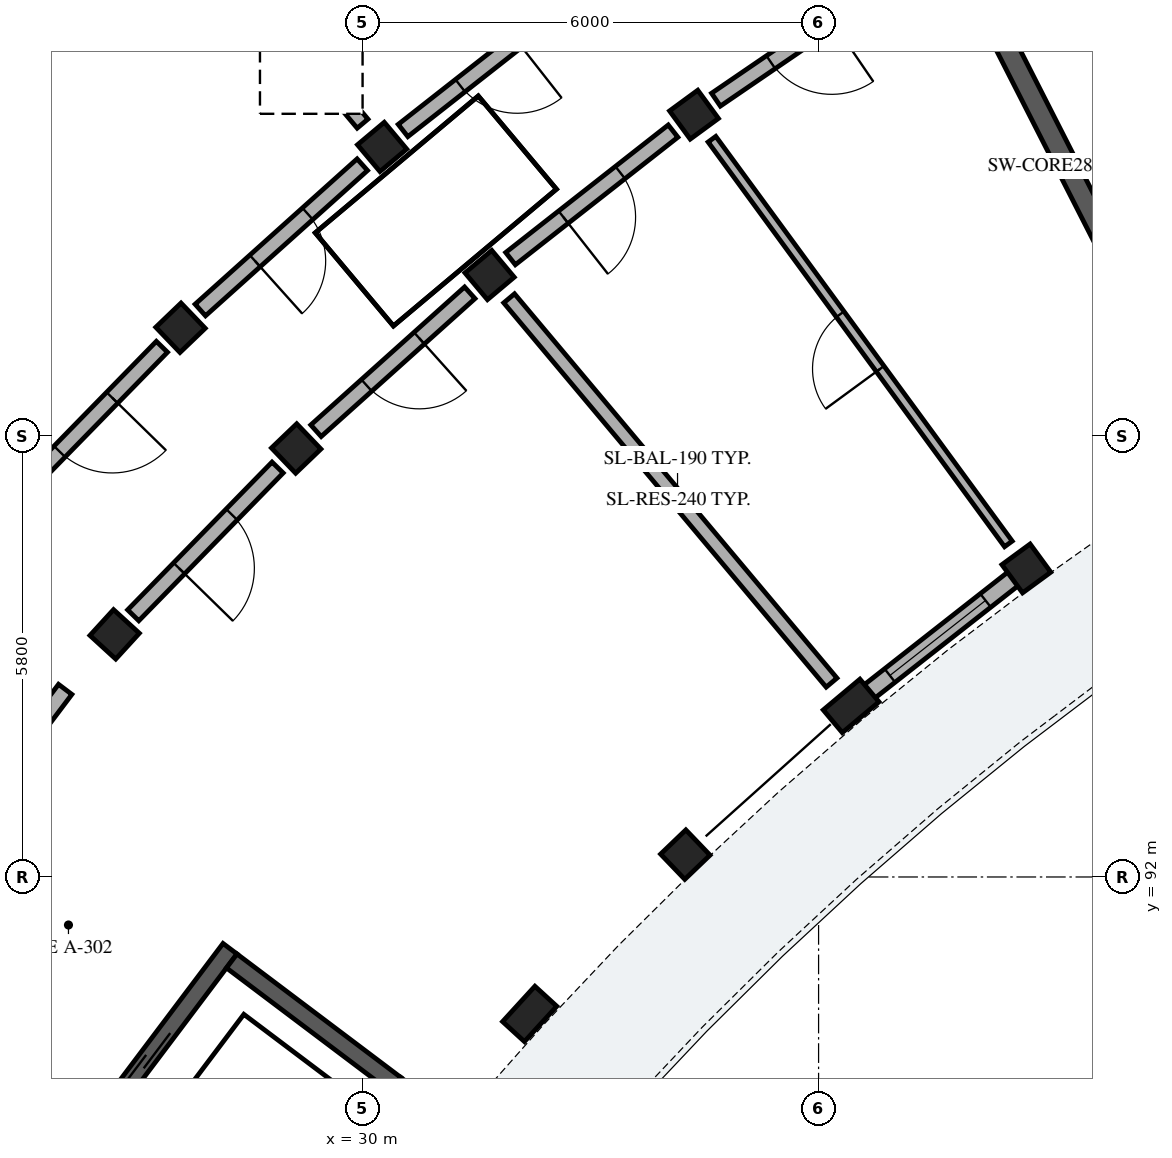
"""IFC4 building model, lengths in metres.
Left out: names, types, materials, properties, quantities, classifications, styles, units other than length and angle.
Written with IfcOpenShell. Run it as: python <this file> out.ifc"""

import sys

from ifc_helpers import new_model, si_unit, direction, frame, frame_2d, origin, origin_2d, place, context, subcontext, project, spatial, rectangle, extrude, element, fill, save


model = new_model("IFC4")
c1 = context("Model", 3, precision=1e-05, world=origin(), true_north=direction((0.0, 1.0)))
c2 = subcontext(c1, "Body", "Model", "MODEL_VIEW")
j1 = project(units=[si_unit("LENGTHUNIT", "METRE"), si_unit("PLANEANGLEUNIT", "RADIAN")], contexts=[c1])
p1 = place(None, origin())
s1 = spatial("IfcSite", under=j1, at=p1, CompositionType="ELEMENT")
p2 = place(p1, origin())
s2 = spatial("IfcBuilding", under=s1, at=p2, CompositionType="ELEMENT")
p3 = place(p2, frame((0.0, 0.0, 49.16)))
s3 = spatial("IfcBuildingStorey", under=s2, at=p3, CompositionType="ELEMENT", Elevation=49.16)
p4 = place(p3, frame((37.773, 104.296, 0.0), z_axis=(0.0, 0.0, 1.0), x_axis=(0.453992276384, -0.891005618941, 0.0)))
e1 = element("IfcWall", 1, at=p4, inside=s3, PredefinedType="SHEAR", context=c2, shape_type="SweptSolid", body=[
    extrude(rectangle(XDim=6.6, YDim=0.28, at=frame_2d((3.3, 0.0))), origin(), (0.0, 0.0, 1.0), 3.11),
])
p5 = place(p3, frame((23.125, 90.453, 0.0), z_axis=(0.0, 0.0, 1.0), x_axis=(0.798639633744, -0.601809550782, 0.0)))
e2 = element("IfcWall", 2, at=p5, inside=s3, PredefinedType="SHEAR", context=c2, shape_type="SweptSolid", body=[
    extrude(rectangle(XDim=6.6, YDim=0.28, at=frame_2d((3.3, 0.0))), origin(), (0.0, 0.0, 1.0), 3.11),
])
p6 = place(p5, frame((0.22, 0.0, 0.0)))
e3 = element("IfcOpeningElement", 3, at=p6, cuts=e2, PredefinedType="OPENING", context=c2, shape_type="SweptSolid", body=[
    extrude(rectangle(XDim=1.05, YDim=2.15, at=frame_2d((0.525, 1.075))), frame((0.0, 0.15, 0.0), z_axis=(0.0, -1.0, 0.0), x_axis=(1.0, 0.0, 0.0)), (0.0, 0.0, 1.0), 0.3),
])
p7 = place(p3, frame((26.294, 88.453, 0.0), z_axis=(0.0, 0.0, 1.0), x_axis=(0.601819781152, 0.798631924615, 0.0)))
e4 = element("IfcWall", 4, at=p7, inside=s3, PredefinedType="SHEAR", context=c2, shape_type="SweptSolid", body=[
    extrude(rectangle(XDim=3.26, YDim=0.23, at=frame_2d((1.63, 0.0))), origin(), (0.0, 0.0, 1.0), 3.11),
])
p8 = place(p7, frame((0.9, 0.0, 0.0)))
e5 = element("IfcOpeningElement", 5, at=p8, cuts=e4, PredefinedType="OPENING", context=c2, shape_type="SweptSolid", body=[
    extrude(rectangle(XDim=1.0, YDim=2.15, at=frame_2d((0.5, 1.075))), frame((0.0, 0.125, 0.0), z_axis=(0.0, -1.0, 0.0), x_axis=(1.0, 0.0, 0.0)), (0.0, 0.0, 1.0), 0.25),
])
p9 = place(p3, frame((28.634, 86.69, 0.0), z_axis=(0.0, 0.0, 1.0), x_axis=(0.601819781152, 0.798631924615, 0.0)))
e6 = element("IfcWall", 6, at=p9, inside=s3, PredefinedType="SHEAR", context=c2, shape_type="SweptSolid", body=[
    extrude(rectangle(XDim=3.26, YDim=0.23, at=frame_2d((1.63, 0.0))), origin(), (0.0, 0.0, 1.0), 3.11),
])
p10 = place(p3, frame((28.279, 90.896, 0.0), z_axis=(0.0, 0.0, 1.0), x_axis=(0.798608971494, -0.601850239387, 0.0)))
e7 = element("IfcWall", 7, at=p10, inside=s3, PredefinedType="SHEAR", context=c2, shape_type="SweptSolid", body=[
    extrude(rectangle(XDim=2.7, YDim=0.23, at=frame_2d((1.35, 0.0))), origin(), (0.0, 0.0, 1.0), 3.11),
])
for number, where, z_axis, x_axis in (
    (8, (38.734, 96.059, 0.0), (0.0, 0.0, 1.0), (-0.591, 0.807, 0.0)),
    (9, (34.361, 102.029, 0.0), (0.0, 0.0, 1.0), (-0.591, 0.807, 0.0)),
):
    element("IfcColumn", number, at=place(p3, frame(where, z_axis=z_axis, x_axis=x_axis)), inside=s3, PredefinedType="COLUMN", context=c2, shape_type="SweptSolid", body=[
        extrude(rectangle(XDim=0.46, YDim=0.46, at=origin_2d()), origin(), (0.0, 0.0, 1.0), 3.1),
    ])
p11 = place(p3, frame((36.428, 94.251, 0.0), z_axis=(0.0, 0.0, 1.0), x_axis=(-0.642787636427, 0.766044420681, 0.0)))
e10 = element("IfcColumn", 10, at=p11, inside=s3, PredefinedType="PILASTER", context=c2, shape_type="SweptSolid", body=[
    extrude(rectangle(XDim=0.39, YDim=0.63, at=origin_2d()), origin(), (0.0, 0.0, 1.0), 3.1),
])
for number, where, z_axis, x_axis in (
    (11, (31.671, 99.919, 0.0), (0.0, 0.0, 1.0), (-0.643, 0.766, 0.0)),
    (12, (30.257, 101.605, 0.0), (0.0, 0.0, 1.0), (-0.643, 0.766, 0.0)),
    (13, (34.247, 92.294, 0.0), (0.0, 0.0, 1.0), (-0.692, 0.722, 0.0)),
    (14, (29.127, 97.637, 0.0), (0.0, 0.0, 1.0), (-0.692, 0.722, 0.0)),
    (15, (27.605, 99.226, 0.0), (0.0, 0.0, 1.0), (-0.692, 0.722, 0.0)),
):
    element("IfcColumn", number, at=place(p3, frame(where, z_axis=z_axis, x_axis=x_axis)), inside=s3, PredefinedType="COLUMN", context=c2, shape_type="SweptSolid", body=[
        extrude(rectangle(XDim=0.46, YDim=0.46, at=origin_2d()), origin(), (0.0, 0.0, 1.0), 3.1),
    ])
p12 = place(p3, frame((32.199, 90.198, 0.0), z_axis=(0.0, 0.0, 1.0), x_axis=(-0.737932089665, 0.674874974378, 0.0)))
e16 = element("IfcColumn", 16, at=p12, inside=s3, PredefinedType="PILASTER", context=c2, shape_type="SweptSolid", body=[
    extrude(rectangle(XDim=0.39, YDim=0.63, at=origin_2d()), origin(), (0.0, 0.0, 1.0), 3.1),
])
p13 = place(p3, frame((26.738, 95.192, 0.0), z_axis=(0.0, 0.0, 1.0), x_axis=(-0.737932089665, 0.674874974378, 0.0)))
e17 = element("IfcColumn", 17, at=p13, inside=s3, PredefinedType="COLUMN", context=c2, shape_type="SweptSolid", body=[
    extrude(rectangle(XDim=0.46, YDim=0.46, at=origin_2d()), origin(), (0.0, 0.0, 1.0), 3.1),
])
p14 = place(p3, frame((38.576, 95.936, 0.0), z_axis=(0.0, 0.0, 1.0), x_axis=(-0.786839825132, -0.617157264874, 0.0)))
e18 = element("IfcWall", 18, at=p14, inside=s3, PredefinedType="SOLIDWALL", context=c2, shape_type="SweptSolid", body=[
    extrude(rectangle(XDim=2.565, YDim=0.225, at=frame_2d((1.283, 0.0))), origin(), (0.0, 0.0, 1.0), 2.355),
])
p15 = place(p14, frame((0.483, 0.0, 0.35)))
e19 = element("IfcOpeningElement", 19, at=p15, cuts=e18, PredefinedType="OPENING", context=c2, shape_type="SweptSolid", body=[
    extrude(rectangle(XDim=1.6, YDim=1.75, at=frame_2d((0.8, 0.875))), frame((0.0, 0.123, 0.0), z_axis=(0.0, -1.0, 0.0), x_axis=(1.0, 0.0, 0.0)), (0.0, 0.0, 1.0), 0.245),
])
p16 = place(p3, frame((23.139, 90.555, 0.0), z_axis=(0.0, 0.0, 1.0), x_axis=(0.601792209296, 0.79865270101, 0.0)))
e20 = element("IfcWall", 20, at=p16, inside=s3, PredefinedType="PARTITIONING", context=c2, shape_type="SweptSolid", body=[
    extrude(rectangle(XDim=4.9, YDim=0.22, at=frame_2d((2.45, 0.0))), origin(), (0.0, 0.0, 1.0), 2.34),
])
p17 = place(p16, frame((1.95, 0.0, 0.0)))
e21 = element("IfcOpeningElement", 21, at=p17, cuts=e20, PredefinedType="OPENING", context=c2, shape_type="SweptSolid", body=[
    extrude(rectangle(XDim=0.98, YDim=2.14, at=frame_2d((0.49, 1.07))), frame((0.0, 0.12, 0.0), z_axis=(0.0, -1.0, 0.0), x_axis=(1.0, 0.0, 0.0)), (0.0, 0.0, 1.0), 0.24),
])
p18 = place(p3, frame((36.895, 103.76, 0.0), z_axis=(0.0, 0.0, 1.0), x_axis=(-0.825752009056, -0.56403334967, 0.0)))
e22 = element("IfcWall", 22, at=p18, inside=s3, PredefinedType="PARTITIONING", context=c2, shape_type="SweptSolid", body=[
    extrude(rectangle(XDim=2.718, YDim=0.205, at=frame_2d((1.359, 0.0))), origin(), (0.0, 0.0, 1.0), 2.37),
])
p19 = place(p18, frame((0.874, 0.0, 0.0)))
e23 = element("IfcOpeningElement", 23, at=p19, cuts=e22, PredefinedType="OPENING", context=c2, shape_type="SweptSolid", body=[
    extrude(rectangle(XDim=0.97, YDim=2.15, at=frame_2d((0.485, 1.075))), frame((0.0, 0.113, 0.0), z_axis=(0.0, -1.0, 0.0), x_axis=(1.0, 0.0, 0.0)), (0.0, 0.0, 1.0), 0.225),
])
p20 = place(p3, frame((38.497, 96.382, 0.0), z_axis=(0.0, 0.0, 1.0), x_axis=(-0.590924179316, 0.806727100263, 0.0)))
e24 = element("IfcWall", 24, at=p20, inside=s3, PredefinedType="PARTITIONING", context=c2, shape_type="SweptSolid", body=[
    extrude(rectangle(XDim=6.6, YDim=0.125, at=frame_2d((3.3, 0.0))), origin(), (0.0, 0.0, 1.0), 2.37),
])
p21 = place(p20, frame((2.855, 0.0, 0.0)))
e25 = element("IfcOpeningElement", 25, at=p21, cuts=e24, PredefinedType="OPENING", context=c2, shape_type="SweptSolid", body=[
    extrude(rectangle(XDim=0.89, YDim=2.1, at=frame_2d((0.445, 1.05))), frame((0.0, 0.073, 0.0), z_axis=(0.0, -1.0, 0.0), x_axis=(1.0, 0.0, 0.0)), (0.0, 0.0, 1.0), 0.145),
])
p22 = place(p3, frame((32.785, 103.588, 0.0), z_axis=(0.0, 0.0, 1.0), x_axis=(-0.786806323554, -0.617199975061, 0.0)))
e26 = element("IfcWall", 26, at=p22, inside=s3, PredefinedType="PARTITIONING", context=c2, shape_type="SweptSolid", body=[
    extrude(rectangle(XDim=2.863, YDim=0.205, at=frame_2d((1.432, 0.0))), origin(), (0.0, 0.0, 1.0), 2.37),
])
p23 = place(p22, frame((0.957, 0.0, 0.0)))
e27 = element("IfcOpeningElement", 27, at=p23, cuts=e26, PredefinedType="OPENING", context=c2, shape_type="SweptSolid", body=[
    extrude(rectangle(XDim=0.95, YDim=2.13, at=frame_2d((0.475, 1.065))), frame((0.0, 0.113, 0.0), z_axis=(0.0, -1.0, 0.0), x_axis=(1.0, 0.0, 0.0)), (0.0, 0.0, 1.0), 0.225),
])
p24 = place(p3, frame((34.085, 101.813, 0.0), z_axis=(0.0, 0.0, 1.0), x_axis=(-0.786835457019, -0.617162833924, 0.0)))
e28 = element("IfcWall", 28, at=p24, inside=s3, PredefinedType="PARTITIONING", context=c2, shape_type="SweptSolid", body=[
    extrude(rectangle(XDim=2.718, YDim=0.205, at=frame_2d((1.359, 0.0))), origin(), (0.0, 0.0, 1.0), 2.37),
])
p25 = place(p24, frame((0.884, 0.0, 0.0)))
e29 = element("IfcOpeningElement", 29, at=p25, cuts=e28, PredefinedType="OPENING", context=c2, shape_type="SweptSolid", body=[
    extrude(rectangle(XDim=0.95, YDim=2.13, at=frame_2d((0.475, 1.065))), frame((0.0, 0.113, 0.0), z_axis=(0.0, -1.0, 0.0), x_axis=(1.0, 0.0, 0.0)), (0.0, 0.0, 1.0), 0.225),
])
p26 = place(p3, frame((30.0, 101.911, 0.0), z_axis=(0.0, 0.0, 1.0), x_axis=(-0.642811926223, 0.766024038465, 0.0)))
e30 = element("IfcWall", 30, at=p26, inside=s3, PredefinedType="PARTITIONING", context=c2, shape_type="SweptSolid", body=[
    extrude(rectangle(XDim=4.7, YDim=0.185, at=frame_2d((2.35, 0.0))), origin(), (0.0, 0.0, 1.0), 2.37),
])
p27 = place(p3, frame((36.171, 94.557, 0.0), z_axis=(0.0, 0.0, 1.0), x_axis=(-0.642789470807, 0.766042881449, 0.0)))
e31 = element("IfcWall", 31, at=p27, inside=s3, PredefinedType="PARTITIONING", context=c2, shape_type="SweptSolid", body=[
    extrude(rectangle(XDim=6.6, YDim=0.185, at=frame_2d((3.3, 0.0))), origin(), (0.0, 0.0, 1.0), 2.37),
])
p28 = place(p3, frame((29.997, 101.371, 0.0), z_axis=(0.0, 0.0, 1.0), x_axis=(-0.744433521088, -0.667696587291, 0.0)))
e32 = element("IfcWall", 32, at=p28, inside=s3, PredefinedType="PARTITIONING", context=c2, shape_type="SweptSolid", body=[
    extrude(rectangle(XDim=2.863, YDim=0.205, at=frame_2d((1.432, 0.0))), origin(), (0.0, 0.0, 1.0), 2.37),
])
p29 = place(p28, frame((0.967, 0.0, 0.0)))
e33 = element("IfcOpeningElement", 33, at=p29, cuts=e32, PredefinedType="OPENING", context=c2, shape_type="SweptSolid", body=[
    extrude(rectangle(XDim=0.93, YDim=2.12, at=frame_2d((0.465, 1.06))), frame((0.0, 0.113, 0.0), z_axis=(0.0, -1.0, 0.0), x_axis=(1.0, 0.0, 0.0)), (0.0, 0.0, 1.0), 0.225),
])
p30 = place(p3, frame((31.411, 99.686, 0.0), z_axis=(0.0, 0.0, 1.0), x_axis=(-0.744418559135, -0.667713268413, 0.0)))
e34 = element("IfcWall", 34, at=p30, inside=s3, PredefinedType="PARTITIONING", context=c2, shape_type="SweptSolid", body=[
    extrude(rectangle(XDim=2.718, YDim=0.205, at=frame_2d((1.359, 0.0))), origin(), (0.0, 0.0, 1.0), 2.37),
])
p31 = place(p30, frame((0.894, 0.0, 0.0)))
e35 = element("IfcOpeningElement", 35, at=p31, cuts=e34, PredefinedType="OPENING", context=c2, shape_type="SweptSolid", body=[
    extrude(rectangle(XDim=0.93, YDim=2.12, at=frame_2d((0.465, 1.06))), frame((0.0, 0.113, 0.0), z_axis=(0.0, -1.0, 0.0), x_axis=(1.0, 0.0, 0.0)), (0.0, 0.0, 1.0), 0.225),
])
p32 = place(p3, frame((27.36, 98.975, 0.0), z_axis=(0.0, 0.0, 1.0), x_axis=(-0.698787219683, -0.715329589496, 0.0)))
e36 = element("IfcWall", 36, at=p32, inside=s3, PredefinedType="PARTITIONING", context=c2, shape_type="SweptSolid", body=[
    extrude(rectangle(XDim=2.863, YDim=0.205, at=frame_2d((1.432, 0.0))), origin(), (0.0, 0.0, 1.0), 2.37),
])
p33 = place(p32, frame((0.937, 0.0, 0.0)))
e37 = element("IfcOpeningElement", 37, at=p33, cuts=e36, PredefinedType="OPENING", context=c2, shape_type="SweptSolid", body=[
    extrude(rectangle(XDim=0.99, YDim=2.16, at=frame_2d((0.495, 1.08))), frame((0.0, 0.113, 0.0), z_axis=(0.0, -1.0, 0.0), x_axis=(1.0, 0.0, 0.0)), (0.0, 0.0, 1.0), 0.225),
])
p34 = place(p3, frame((28.882, 97.387, 0.0), z_axis=(0.0, 0.0, 1.0), x_axis=(-0.698840007829, -0.715278018296, 0.0)))
e38 = element("IfcWall", 38, at=p34, inside=s3, PredefinedType="PARTITIONING", context=c2, shape_type="SweptSolid", body=[
    extrude(rectangle(XDim=2.718, YDim=0.205, at=frame_2d((1.359, 0.0))), origin(), (0.0, 0.0, 1.0), 2.37),
])
p35 = place(p34, frame((0.864, 0.0, 0.0)))
e39 = element("IfcOpeningElement", 39, at=p35, cuts=e38, PredefinedType="OPENING", context=c2, shape_type="SweptSolid", body=[
    extrude(rectangle(XDim=0.99, YDim=2.16, at=frame_2d((0.495, 1.08))), frame((0.0, 0.113, 0.0), z_axis=(0.0, -1.0, 0.0), x_axis=(1.0, 0.0, 0.0)), (0.0, 0.0, 1.0), 0.225),
])
p36 = place(p15, origin())
e40 = element("IfcWindow", 40, at=p36, inside=s3, PartitioningType="SINGLE_PANEL", PredefinedType="WINDOW", context=c2, shape_type="SweptSolid", body=[
    extrude(rectangle(XDim=1.6, YDim=1.75, at=frame_2d((0.8, 0.875))), frame((0.0, 0.03, 0.0), z_axis=(0.0, -1.0, 0.0), x_axis=(1.0, 0.0, 0.0)), (0.0, 0.0, 1.0), 0.06),
])
fill(e19, e40)
p37 = place(p2, frame((0.0, 0.0, 52.52)))
p38 = place(p37, frame((0.0, 0.0, -0.26)))
p39 = place(p38, frame((29.325, 102.716, 0.21)))
e41 = element("IfcWindow", 41, at=p39, inside=s3, PartitioningType="SINGLE_PANEL", PredefinedType="SKYLIGHT", context=c2, shape_type="SweptSolid", body=[
    extrude(rectangle(XDim=1.35, YDim=1.35, at=origin_2d()), origin(), (0.0, 0.0, 1.0), 0.05),
])
p40 = place(p8, origin())
e42 = element("IfcDoor", 42, at=p40, inside=s3, OperationType="DOUBLE_DOOR_SLIDING", PredefinedType="DOOR", context=c2, shape_type="SweptSolid", body=[
    extrude(rectangle(XDim=1.0, YDim=2.15, at=frame_2d((0.5, 1.075))), frame((0.0, 0.025, 0.0), z_axis=(0.0, -1.0, 0.0), x_axis=(1.0, 0.0, 0.0)), (0.0, 0.0, 1.0), 0.05),
])
fill(e5, e42)
p41 = place(p19, origin())
e43 = element("IfcDoor", 43, at=p41, inside=s3, OperationType="SINGLE_SWING_LEFT", PredefinedType="DOOR", context=c2, shape_type="SweptSolid", body=[
    extrude(rectangle(XDim=0.97, YDim=2.15, at=frame_2d((0.485, 1.075))), frame((0.0, 0.025, 0.0), z_axis=(0.0, -1.0, 0.0), x_axis=(1.0, 0.0, 0.0)), (0.0, 0.0, 1.0), 0.05),
])
fill(e23, e43)
p42 = place(p21, origin())
e44 = element("IfcDoor", 44, at=p42, inside=s3, OperationType="SINGLE_SWING_LEFT", PredefinedType="DOOR", context=c2, shape_type="SweptSolid", body=[
    extrude(rectangle(XDim=0.89, YDim=2.1, at=frame_2d((0.445, 1.05))), frame((0.0, 0.025, 0.0), z_axis=(0.0, -1.0, 0.0), x_axis=(1.0, 0.0, 0.0)), (0.0, 0.0, 1.0), 0.05),
])
fill(e25, e44)
p43 = place(p23, origin())
e45 = element("IfcDoor", 45, at=p43, inside=s3, OperationType="SINGLE_SWING_LEFT", PredefinedType="DOOR", context=c2, shape_type="SweptSolid", body=[
    extrude(rectangle(XDim=0.95, YDim=2.13, at=frame_2d((0.475, 1.065))), frame((0.0, 0.025, 0.0), z_axis=(0.0, -1.0, 0.0), x_axis=(1.0, 0.0, 0.0)), (0.0, 0.0, 1.0), 0.05),
])
fill(e27, e45)
p44 = place(p25, origin())
e46 = element("IfcDoor", 46, at=p44, inside=s3, OperationType="SINGLE_SWING_RIGHT", PredefinedType="DOOR", context=c2, shape_type="SweptSolid", body=[
    extrude(rectangle(XDim=0.95, YDim=2.13, at=frame_2d((0.475, 1.065))), frame((0.0, 0.025, 0.0), z_axis=(0.0, -1.0, 0.0), x_axis=(1.0, 0.0, 0.0)), (0.0, 0.0, 1.0), 0.05),
])
fill(e29, e46)
p45 = place(p29, origin())
e47 = element("IfcDoor", 47, at=p45, inside=s3, OperationType="SINGLE_SWING_RIGHT", PredefinedType="DOOR", context=c2, shape_type="SweptSolid", body=[
    extrude(rectangle(XDim=0.93, YDim=2.12, at=frame_2d((0.465, 1.06))), frame((0.0, 0.025, 0.0), z_axis=(0.0, -1.0, 0.0), x_axis=(1.0, 0.0, 0.0)), (0.0, 0.0, 1.0), 0.05),
])
fill(e33, e47)
p46 = place(p31, origin())
e48 = element("IfcDoor", 48, at=p46, inside=s3, OperationType="SINGLE_SWING_LEFT", PredefinedType="DOOR", context=c2, shape_type="SweptSolid", body=[
    extrude(rectangle(XDim=0.93, YDim=2.12, at=frame_2d((0.465, 1.06))), frame((0.0, 0.025, 0.0), z_axis=(0.0, -1.0, 0.0), x_axis=(1.0, 0.0, 0.0)), (0.0, 0.0, 1.0), 0.05),
])
fill(e35, e48)
p47 = place(p33, origin())
e49 = element("IfcDoor", 49, at=p47, inside=s3, OperationType="SINGLE_SWING_LEFT", PredefinedType="DOOR", context=c2, shape_type="SweptSolid", body=[
    extrude(rectangle(XDim=0.99, YDim=2.16, at=frame_2d((0.495, 1.08))), frame((0.0, 0.025, 0.0), z_axis=(0.0, -1.0, 0.0), x_axis=(1.0, 0.0, 0.0)), (0.0, 0.0, 1.0), 0.05),
])
fill(e37, e49)
p48 = place(p35, origin())
e50 = element("IfcDoor", 50, at=p48, inside=s3, OperationType="SINGLE_SWING_RIGHT", PredefinedType="DOOR", context=c2, shape_type="SweptSolid", body=[
    extrude(rectangle(XDim=0.99, YDim=2.16, at=frame_2d((0.495, 1.08))), frame((0.0, 0.025, 0.0), z_axis=(0.0, -1.0, 0.0), x_axis=(1.0, 0.0, 0.0)), (0.0, 0.0, 1.0), 0.05),
])
fill(e39, e50)
save(model, sys.argv[1])
